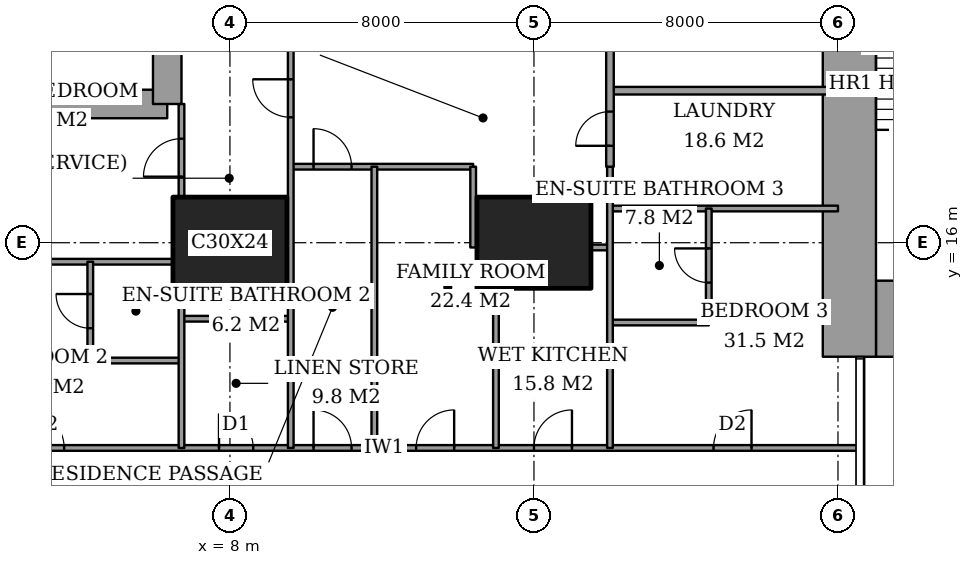
"""IFC4 building model, lengths in metres.
Left out: names, types, materials, properties, quantities, classifications, styles, units other than length and angle.
Written with IfcOpenShell. Run it as: python <this file> out.ifc"""

import sys

from ifc_helpers import new_model, si_unit, direction, frame, frame_2d, origin, origin_2d, place, context, subcontext, project, spatial, rectangle, extrude, element, fill, save


model = new_model("IFC4")
c1 = context("Model", 3, precision=1e-05, world=origin(), true_north=direction((0.0, 1.0)))
c2 = subcontext(c1, "Body", "Model", "MODEL_VIEW")
j1 = project(units=[si_unit("LENGTHUNIT", "METRE"), si_unit("PLANEANGLEUNIT", "RADIAN")], contexts=[c1])
p1 = place(None, origin())
s1 = spatial("IfcSite", under=j1, at=p1, CompositionType="ELEMENT")
p2 = place(p1, origin())
s2 = spatial("IfcBuilding", under=s1, at=p2, CompositionType="ELEMENT")
p3 = place(p2, frame((0.0, 0.0, 164.6)))
s3 = spatial("IfcBuildingStorey", under=s2, at=p3, CompositionType="ELEMENT", Elevation=164.6)
for number, where, z_axis, x_axis in (
    (1, (8.0, 16.0, 0.0), (0.0, 0.0, 1.0), (1.0, 0.0, 0.0)),
    (2, (16.0, 16.0, 0.0), (0.0, 0.0, 1.0), (1.0, 0.0, 0.0)),
):
    element("IfcColumn", number, at=place(p3, frame(where, z_axis=z_axis, x_axis=x_axis)), inside=s3, PredefinedType="COLUMN", context=c2, shape_type="SweptSolid", body=[
        extrude(rectangle(XDim=3.0, YDim=2.4, at=origin_2d()), origin(), (0.0, 0.0, 1.0), 3.6),
    ])
p4 = place(p3, frame((25.0, 14.0, 0.0), z_axis=(0.0, 0.0, 1.0), x_axis=(1.0, 0.0, 0.0)))
e3 = element("IfcWall", 3, at=p4, inside=s3, PredefinedType="SHEAR", context=c2, shape_type="SweptSolid", body=[
    extrude(rectangle(XDim=3.15, YDim=2.0, at=frame_2d((1.575, 0.0))), origin(), (0.0, 0.0, 1.0), 3.6),
])
p5 = place(p3, frame((24.3, 13.0, 0.0), z_axis=(0.0, 0.0, 1.0), x_axis=(0.0, 1.0, 0.0)))
e4 = element("IfcWall", 4, at=p5, inside=s3, PredefinedType="SHEAR", context=c2, shape_type="SweptSolid", body=[
    extrude(rectangle(XDim=10.15, YDim=1.4, at=frame_2d((5.075, 0.0))), origin(), (0.0, 0.0, 1.0), 3.6),
])
p6 = place(p3, frame((1.9, 19.65, 0.0), z_axis=(0.0, 0.0, 1.0), x_axis=(1.0, 0.0, 0.0)))
e5 = element("IfcWall", 5, at=p6, inside=s3, PredefinedType="SHEAR", context=c2, shape_type="SweptSolid", body=[
    extrude(rectangle(XDim=4.45, YDim=0.75, at=frame_2d((2.225, 0.0))), origin(), (0.0, 0.0, 1.0), 3.6),
])
p7 = place(p3, frame((6.35, 19.65, 0.0), z_axis=(0.0, 0.0, 1.0), x_axis=(0.0, 1.0, 0.0)))
e6 = element("IfcWall", 6, at=p7, inside=s3, PredefinedType="SHEAR", context=c2, shape_type="SweptSolid", body=[
    extrude(rectangle(XDim=8.7, YDim=0.75, at=frame_2d((4.35, 0.0))), origin(), (0.0, 0.0, 1.0), 3.6),
])
p8 = place(p7, frame((6.725, 0.0, 0.0)))
e7 = element("IfcOpeningElement", 7, at=p8, cuts=e6, PredefinedType="OPENING", context=c2, shape_type="SweptSolid", body=[
    extrude(rectangle(XDim=1.0, YDim=2.1, at=frame_2d((0.5, 1.05))), frame((0.0, 0.385, 0.0), z_axis=(0.0, -1.0, 0.0), x_axis=(1.0, 0.0, 0.0)), (0.0, 0.0, 1.0), 0.77),
])
p9 = place(p3, frame((-0.45, 10.6, 0.0), z_axis=(0.0, 0.0, 1.0), x_axis=(1.0, 0.0, 0.0)))
e8 = element("IfcWall", 8, at=p9, inside=s3, PredefinedType="PARTITIONING", context=c2, shape_type="SweptSolid", body=[
    extrude(rectangle(XDim=25.011, YDim=0.15, at=frame_2d((12.505, 0.0))), origin(), (0.0, 0.0, 1.0), 3.35),
])
p10 = place(p9, frame((10.65, 0.0, 0.0)))
e9 = element("IfcOpeningElement", 9, at=p10, cuts=e8, PredefinedType="OPENING", context=c2, shape_type="SweptSolid", body=[
    extrude(rectangle(XDim=1.0, YDim=2.1, at=frame_2d((0.5, 1.05))), frame((0.0, 0.085, 0.0), z_axis=(0.0, -1.0, 0.0), x_axis=(1.0, 0.0, 0.0)), (0.0, 0.0, 1.0), 0.17),
])
p11 = place(p9, frame((3.087, 0.0, 0.0)))
e10 = element("IfcOpeningElement", 10, at=p11, cuts=e8, PredefinedType="OPENING", context=c2, shape_type="SweptSolid", body=[
    extrude(rectangle(XDim=1.0, YDim=2.1, at=frame_2d((0.5, 1.05))), frame((0.0, 0.085, 0.0), z_axis=(0.0, -1.0, 0.0), x_axis=(1.0, 0.0, 0.0)), (0.0, 0.0, 1.0), 0.17),
])
p12 = place(p9, frame((8.163, 0.0, 0.0)))
e11 = element("IfcOpeningElement", 11, at=p12, cuts=e8, PredefinedType="OPENING", context=c2, shape_type="SweptSolid", body=[
    extrude(rectangle(XDim=0.9, YDim=2.1, at=frame_2d((0.45, 1.05))), frame((0.0, 0.085, 0.0), z_axis=(0.0, -1.0, 0.0), x_axis=(1.0, 0.0, 0.0)), (0.0, 0.0, 1.0), 0.17),
])
p13 = place(p9, frame((13.35, 0.0, 0.0)))
e12 = element("IfcOpeningElement", 12, at=p13, cuts=e8, PredefinedType="OPENING", context=c2, shape_type="SweptSolid", body=[
    extrude(rectangle(XDim=1.0, YDim=2.1, at=frame_2d((0.5, 1.05))), frame((0.0, 0.085, 0.0), z_axis=(0.0, -1.0, 0.0), x_axis=(1.0, 0.0, 0.0)), (0.0, 0.0, 1.0), 0.17),
])
p14 = place(p9, frame((16.45, 0.0, 0.0)))
e13 = element("IfcOpeningElement", 13, at=p14, cuts=e8, PredefinedType="OPENING", context=c2, shape_type="SweptSolid", body=[
    extrude(rectangle(XDim=1.0, YDim=2.1, at=frame_2d((0.5, 1.05))), frame((0.0, 0.085, 0.0), z_axis=(0.0, -1.0, 0.0), x_axis=(1.0, 0.0, 0.0)), (0.0, 0.0, 1.0), 0.17),
])
p15 = place(p9, frame((21.175, 0.0, 0.0)))
e14 = element("IfcOpeningElement", 14, at=p15, cuts=e8, PredefinedType="OPENING", context=c2, shape_type="SweptSolid", body=[
    extrude(rectangle(XDim=1.0, YDim=2.1, at=frame_2d((0.5, 1.05))), frame((0.0, 0.085, 0.0), z_axis=(0.0, -1.0, 0.0), x_axis=(1.0, 0.0, 0.0)), (0.0, 0.0, 1.0), 0.17),
])
p16 = place(p3, frame((4.325, 12.9, 0.0), z_axis=(0.0, 0.0, 1.0), x_axis=(1.0, 0.0, 0.0)))
e15 = element("IfcWall", 15, at=p16, inside=s3, PredefinedType="PARTITIONING", context=c2, shape_type="SweptSolid", body=[
    extrude(rectangle(XDim=2.4, YDim=0.15, at=frame_2d((1.2, 0.0))), origin(), (0.0, 0.0, 1.0), 3.35),
])
p17 = place(p3, frame((18.0, 13.9, 0.0), z_axis=(0.0, 0.0, 1.0), x_axis=(1.0, 0.0, 0.0)))
e16 = element("IfcWall", 16, at=p17, inside=s3, PredefinedType="PARTITIONING", context=c2, shape_type="SweptSolid", body=[
    extrude(rectangle(XDim=2.6, YDim=0.15, at=frame_2d((1.3, 0.0))), origin(), (0.0, 0.0, 1.0), 3.35),
])
p18 = place(p3, frame((6.725, 14.0, 0.0), z_axis=(0.0, 0.0, 1.0), x_axis=(1.0, 0.0, 0.0)))
e17 = element("IfcWall", 17, at=p18, inside=s3, PredefinedType="PARTITIONING", context=c2, shape_type="SweptSolid", body=[
    extrude(rectangle(XDim=2.875, YDim=0.15, at=frame_2d((1.438, 0.0))), origin(), (0.0, 0.0, 1.0), 3.35),
])
p19 = place(p3, frame((1.35, 15.5, 0.0), z_axis=(0.0, 0.0, 1.0), x_axis=(1.0, 0.0, 0.0)))
e18 = element("IfcWall", 18, at=p19, inside=s3, PredefinedType="PARTITIONING", context=c2, shape_type="SweptSolid", body=[
    extrude(rectangle(XDim=5.15, YDim=0.15, at=frame_2d((2.575, 0.0))), origin(), (0.0, 0.0, 1.0), 3.35),
])
p20 = place(p3, frame((17.5, 15.875, 0.0), z_axis=(0.0, 0.0, 1.0), x_axis=(1.0, 0.0, 0.0)))
e19 = element("IfcWall", 19, at=p20, inside=s3, PredefinedType="PARTITIONING", context=c2, shape_type="SweptSolid", body=[
    extrude(rectangle(XDim=0.5, YDim=0.15, at=frame_2d((0.25, 0.0))), origin(), (0.0, 0.0, 1.0), 2.634),
])
p21 = place(p3, frame((18.0, 16.9, 0.0), z_axis=(0.0, 0.0, 1.0), x_axis=(1.0, 0.0, 0.0)))
e20 = element("IfcWall", 20, at=p21, inside=s3, PredefinedType="PARTITIONING", context=c2, shape_type="SweptSolid", body=[
    extrude(rectangle(XDim=6.0, YDim=0.15, at=frame_2d((3.0, 0.0))), origin(), (0.0, 0.0, 1.0), 3.35),
])
p22 = place(p3, frame((9.6, 18.0, 0.0), z_axis=(0.0, 0.0, 1.0), x_axis=(1.0, 0.0, 0.0)))
e21 = element("IfcWall", 21, at=p22, inside=s3, PredefinedType="PARTITIONING", context=c2, shape_type="SweptSolid", body=[
    extrude(rectangle(XDim=4.8, YDim=0.15, at=frame_2d((2.4, 0.0))), origin(), (0.0, 0.0, 1.0), 3.35),
])
p23 = place(p22, frame((0.6, 0.0, 0.0)))
e22 = element("IfcOpeningElement", 22, at=p23, cuts=e21, PredefinedType="OPENING", context=c2, shape_type="SweptSolid", body=[
    extrude(rectangle(XDim=1.0, YDim=2.1, at=frame_2d((0.5, 1.05))), frame((0.0, 0.085, 0.0), z_axis=(0.0, -1.0, 0.0), x_axis=(1.0, 0.0, 0.0)), (0.0, 0.0, 1.0), 0.17),
])
p24 = place(p3, frame((18.0, 20.0, 0.0), z_axis=(0.0, 0.0, 1.0), x_axis=(1.0, 0.0, 0.0)))
e23 = element("IfcWall", 23, at=p24, inside=s3, PredefinedType="PARTITIONING", context=c2, shape_type="SweptSolid", body=[
    extrude(rectangle(XDim=6.0, YDim=0.2, at=frame_2d((3.0, 0.0))), origin(), (0.0, 0.0, 1.0), 3.35),
])
p25 = place(p3, frame((4.325, 12.9, 0.0), z_axis=(0.0, 0.0, 1.0), x_axis=(0.0, 1.0, 0.0)))
e24 = element("IfcWall", 24, at=p25, inside=s3, PredefinedType="PARTITIONING", context=c2, shape_type="SweptSolid", body=[
    extrude(rectangle(XDim=2.6, YDim=0.15, at=frame_2d((1.3, 0.0))), origin(), (0.0, 0.0, 1.0), 3.35),
])
p26 = place(p25, frame((0.85, 0.0, 0.0)))
e25 = element("IfcOpeningElement", 25, at=p26, cuts=e24, PredefinedType="OPENING", context=c2, shape_type="SweptSolid", body=[
    extrude(rectangle(XDim=0.9, YDim=2.1, at=frame_2d((0.45, 1.05))), frame((0.0, 0.085, 0.0), z_axis=(0.0, -1.0, 0.0), x_axis=(1.0, 0.0, 0.0)), (0.0, 0.0, 1.0), 0.17),
])
p27 = place(p3, frame((6.725, 10.6, 0.0), z_axis=(0.0, 0.0, 1.0), x_axis=(0.0, 1.0, 0.0)))
e26 = element("IfcWall", 26, at=p27, inside=s3, PredefinedType="PARTITIONING", context=c2, shape_type="SweptSolid", body=[
    extrude(rectangle(XDim=4.2, YDim=0.15, at=frame_2d((2.1, 0.0))), origin(), (0.0, 0.0, 1.0), 3.35),
])
p28 = place(p3, frame((6.725, 17.2, 0.0), z_axis=(0.0, 0.0, 1.0), x_axis=(0.0, 1.0, 0.0)))
e27 = element("IfcWall", 27, at=p28, inside=s3, PredefinedType="PARTITIONING", context=c2, shape_type="SweptSolid", body=[
    extrude(rectangle(XDim=2.45, YDim=0.15, at=frame_2d((1.225, 0.0))), origin(), (0.0, 0.0, 1.0), 3.35),
])
p29 = place(p28, frame((0.538, 0.0, 0.0)))
e28 = element("IfcOpeningElement", 28, at=p29, cuts=e27, PredefinedType="OPENING", context=c2, shape_type="SweptSolid", body=[
    extrude(rectangle(XDim=1.0, YDim=2.1, at=frame_2d((0.5, 1.05))), frame((0.0, 0.085, 0.0), z_axis=(0.0, -1.0, 0.0), x_axis=(1.0, 0.0, 0.0)), (0.0, 0.0, 1.0), 0.17),
])
p30 = place(p3, frame((9.6, 10.6, 0.0), z_axis=(0.0, 0.0, 1.0), x_axis=(0.0, 1.0, 0.0)))
e29 = element("IfcWall", 29, at=p30, inside=s3, PredefinedType="PARTITIONING", context=c2, shape_type="SweptSolid", body=[
    extrude(rectangle(XDim=11.0, YDim=0.15, at=frame_2d((5.5, 0.0))), origin(), (0.0, 0.0, 1.0), 3.35),
])
p31 = place(p30, frame((8.7, 0.0, 0.0)))
e30 = element("IfcOpeningElement", 30, at=p31, cuts=e29, PredefinedType="OPENING", context=c2, shape_type="SweptSolid", body=[
    extrude(rectangle(XDim=1.0, YDim=2.1, at=frame_2d((0.5, 1.05))), frame((0.0, 0.085, 0.0), z_axis=(0.0, -1.0, 0.0), x_axis=(1.0, 0.0, 0.0)), (0.0, 0.0, 1.0), 0.17),
])
p32 = place(p3, frame((11.8, 10.6, 0.0), z_axis=(0.0, 0.0, 1.0), x_axis=(0.0, 1.0, 0.0)))
e31 = element("IfcWall", 31, at=p32, inside=s3, PredefinedType="PARTITIONING", context=c2, shape_type="SweptSolid", body=[
    extrude(rectangle(XDim=7.4, YDim=0.15, at=frame_2d((3.7, 0.0))), origin(), (0.0, 0.0, 1.0), 3.35),
])
p33 = place(p3, frame((14.4, 15.875, 0.0), z_axis=(0.0, 0.0, 1.0), x_axis=(0.0, 1.0, 0.0)))
e32 = element("IfcWall", 32, at=p33, inside=s3, PredefinedType="PARTITIONING", context=c2, shape_type="SweptSolid", body=[
    extrude(rectangle(XDim=2.125, YDim=0.15, at=frame_2d((1.062, 0.0))), origin(), (0.0, 0.0, 1.0), 3.35),
])
p34 = place(p3, frame((15.0, 10.6, 0.0), z_axis=(0.0, 0.0, 1.0), x_axis=(0.0, 1.0, 0.0)))
e33 = element("IfcWall", 33, at=p34, inside=s3, PredefinedType="PARTITIONING", context=c2, shape_type="SweptSolid", body=[
    extrude(rectangle(XDim=4.2, YDim=0.15, at=frame_2d((2.1, 0.0))), origin(), (0.0, 0.0, 1.0), 3.35),
])
p35 = place(p3, frame((18.0, 18.0, 0.0), z_axis=(0.0, 0.0, 1.0), x_axis=(0.0, 1.0, 0.0)))
e34 = element("IfcWall", 34, at=p35, inside=s3, PredefinedType="PARTITIONING", context=c2, shape_type="SweptSolid", body=[
    extrude(rectangle(XDim=6.0, YDim=0.2, at=frame_2d((3.0, 0.0))), origin(), (0.0, 0.0, 1.0), 3.35),
])
p36 = place(p35, frame((3.4, 0.0, 0.0)))
e35 = element("IfcOpeningElement", 35, at=p36, cuts=e34, PredefinedType="OPENING", context=c2, shape_type="SweptSolid", body=[
    extrude(rectangle(XDim=1.2, YDim=2.4, at=frame_2d((0.6, 1.2))), frame((0.0, 0.11, 0.0), z_axis=(0.0, -1.0, 0.0), x_axis=(1.0, 0.0, 0.0)), (0.0, 0.0, 1.0), 0.22),
])
p37 = place(p35, frame((0.55, 0.0, 0.0)))
e36 = element("IfcOpeningElement", 36, at=p37, cuts=e34, PredefinedType="OPENING", context=c2, shape_type="SweptSolid", body=[
    extrude(rectangle(XDim=0.9, YDim=2.1, at=frame_2d((0.45, 1.05))), frame((0.0, 0.11, 0.0), z_axis=(0.0, -1.0, 0.0), x_axis=(1.0, 0.0, 0.0)), (0.0, 0.0, 1.0), 0.22),
])
p38 = place(p3, frame((18.0, 10.6, 0.0), z_axis=(0.0, 0.0, 1.0), x_axis=(0.0, 1.0, 0.0)))
e37 = element("IfcWall", 37, at=p38, inside=s3, PredefinedType="PARTITIONING", context=c2, shape_type="SweptSolid", body=[
    extrude(rectangle(XDim=7.4, YDim=0.15, at=frame_2d((3.7, 0.0))), origin(), (0.0, 0.0, 1.0), 3.35),
])
p39 = place(p3, frame((20.6, 13.9, 0.0), z_axis=(0.0, 0.0, 1.0), x_axis=(0.0, 1.0, 0.0)))
e38 = element("IfcWall", 38, at=p39, inside=s3, PredefinedType="PARTITIONING", context=c2, shape_type="SweptSolid", body=[
    extrude(rectangle(XDim=3.0, YDim=0.15, at=frame_2d((1.5, 0.0))), origin(), (0.0, 0.0, 1.0), 3.35),
])
p40 = place(p39, frame((1.05, 0.0, 0.0)))
e39 = element("IfcOpeningElement", 39, at=p40, cuts=e38, PredefinedType="OPENING", context=c2, shape_type="SweptSolid", body=[
    extrude(rectangle(XDim=0.9, YDim=2.1, at=frame_2d((0.45, 1.05))), frame((0.0, 0.085, 0.0), z_axis=(0.0, -1.0, 0.0), x_axis=(1.0, 0.0, 0.0)), (0.0, 0.0, 1.0), 0.17),
])
p41 = place(p10, origin())
e40 = element("IfcDoor", 40, at=p41, inside=s3, OperationType="SINGLE_SWING_RIGHT", PredefinedType="DOOR", context=c2, shape_type="SweptSolid", body=[
    extrude(rectangle(XDim=1.0, YDim=2.1, at=frame_2d((0.5, 1.05))), frame((0.0, 0.025, 0.0), z_axis=(0.0, -1.0, 0.0), x_axis=(1.0, 0.0, 0.0)), (0.0, 0.0, 1.0), 0.05),
])
fill(e9, e40)
p42 = place(p26, origin())
e41 = element("IfcDoor", 41, at=p42, inside=s3, OperationType="SINGLE_SWING_LEFT", PredefinedType="DOOR", context=c2, shape_type="SweptSolid", body=[
    extrude(rectangle(XDim=0.9, YDim=2.1, at=frame_2d((0.45, 1.05))), frame((0.0, 0.025, 0.0), z_axis=(0.0, -1.0, 0.0), x_axis=(1.0, 0.0, 0.0)), (0.0, 0.0, 1.0), 0.05),
])
fill(e25, e41)
p43 = place(p11, origin())
e42 = element("IfcDoor", 42, at=p43, inside=s3, OperationType="SINGLE_SWING_RIGHT", PredefinedType="DOOR", context=c2, shape_type="SweptSolid", body=[
    extrude(rectangle(XDim=1.0, YDim=2.1, at=frame_2d((0.5, 1.05))), frame((0.0, 0.025, 0.0), z_axis=(0.0, -1.0, 0.0), x_axis=(1.0, 0.0, 0.0)), (0.0, 0.0, 1.0), 0.05),
])
fill(e10, e42)
p44 = place(p29, origin())
e43 = element("IfcDoor", 43, at=p44, inside=s3, OperationType="SINGLE_SWING_RIGHT", PredefinedType="DOOR", context=c2, shape_type="SweptSolid", body=[
    extrude(rectangle(XDim=1.0, YDim=2.1, at=frame_2d((0.5, 1.05))), frame((0.0, 0.025, 0.0), z_axis=(0.0, -1.0, 0.0), x_axis=(1.0, 0.0, 0.0)), (0.0, 0.0, 1.0), 0.05),
])
fill(e28, e43)
p45 = place(p12, origin())
e44 = element("IfcDoor", 44, at=p45, inside=s3, OperationType="SINGLE_SWING_RIGHT", PredefinedType="DOOR", context=c2, shape_type="SweptSolid", body=[
    extrude(rectangle(XDim=0.9, YDim=2.1, at=frame_2d((0.45, 1.05))), frame((0.0, 0.025, 0.0), z_axis=(0.0, -1.0, 0.0), x_axis=(1.0, 0.0, 0.0)), (0.0, 0.0, 1.0), 0.05),
])
fill(e11, e44)
p46 = place(p31, origin())
e45 = element("IfcDoor", 45, at=p46, inside=s3, OperationType="SINGLE_SWING_LEFT", PredefinedType="DOOR", context=c2, shape_type="SweptSolid", body=[
    extrude(rectangle(XDim=1.0, YDim=2.1, at=frame_2d((0.5, 1.05))), frame((0.0, 0.025, 0.0), z_axis=(0.0, -1.0, 0.0), x_axis=(1.0, 0.0, 0.0)), (0.0, 0.0, 1.0), 0.05),
])
fill(e30, e45)
p47 = place(p23, origin())
e46 = element("IfcDoor", 46, at=p47, inside=s3, OperationType="SINGLE_SWING_RIGHT", PredefinedType="DOOR", context=c2, shape_type="SweptSolid", body=[
    extrude(rectangle(XDim=1.0, YDim=2.1, at=frame_2d((0.5, 1.05))), frame((0.0, 0.025, 0.0), z_axis=(0.0, -1.0, 0.0), x_axis=(1.0, 0.0, 0.0)), (0.0, 0.0, 1.0), 0.05),
])
fill(e22, e46)
p48 = place(p13, origin())
e47 = element("IfcDoor", 47, at=p48, inside=s3, OperationType="SINGLE_SWING_LEFT", PredefinedType="DOOR", context=c2, shape_type="SweptSolid", body=[
    extrude(rectangle(XDim=1.0, YDim=2.1, at=frame_2d((0.5, 1.05))), frame((0.0, 0.025, 0.0), z_axis=(0.0, -1.0, 0.0), x_axis=(1.0, 0.0, 0.0)), (0.0, 0.0, 1.0), 0.05),
])
fill(e12, e47)
p49 = place(p14, origin())
e48 = element("IfcDoor", 48, at=p49, inside=s3, OperationType="SINGLE_SWING_LEFT", PredefinedType="DOOR", context=c2, shape_type="SweptSolid", body=[
    extrude(rectangle(XDim=1.0, YDim=2.1, at=frame_2d((0.5, 1.05))), frame((0.0, 0.025, 0.0), z_axis=(0.0, -1.0, 0.0), x_axis=(1.0, 0.0, 0.0)), (0.0, 0.0, 1.0), 0.05),
])
fill(e13, e48)
p50 = place(p40, origin())
e49 = element("IfcDoor", 49, at=p50, inside=s3, OperationType="SINGLE_SWING_LEFT", PredefinedType="DOOR", context=c2, shape_type="SweptSolid", body=[
    extrude(rectangle(XDim=0.9, YDim=2.1, at=frame_2d((0.45, 1.05))), frame((0.0, 0.025, 0.0), z_axis=(0.0, -1.0, 0.0), x_axis=(1.0, 0.0, 0.0)), (0.0, 0.0, 1.0), 0.05),
])
fill(e39, e49)
p51 = place(p15, origin())
e50 = element("IfcDoor", 50, at=p51, inside=s3, OperationType="SINGLE_SWING_LEFT", PredefinedType="DOOR", context=c2, shape_type="SweptSolid", body=[
    extrude(rectangle(XDim=1.0, YDim=2.1, at=frame_2d((0.5, 1.05))), frame((0.0, 0.025, 0.0), z_axis=(0.0, -1.0, 0.0), x_axis=(1.0, 0.0, 0.0)), (0.0, 0.0, 1.0), 0.05),
])
fill(e14, e50)
p52 = place(p37, origin())
e51 = element("IfcDoor", 51, at=p52, inside=s3, OperationType="SINGLE_SWING_RIGHT", PredefinedType="DOOR", context=c2, shape_type="SweptSolid", body=[
    extrude(rectangle(XDim=0.9, YDim=2.1, at=frame_2d((0.45, 1.05))), frame((0.0, 0.025, 0.0), z_axis=(0.0, -1.0, 0.0), x_axis=(1.0, 0.0, 0.0)), (0.0, 0.0, 1.0), 0.05),
])
fill(e36, e51)
save(model, sys.argv[1])
